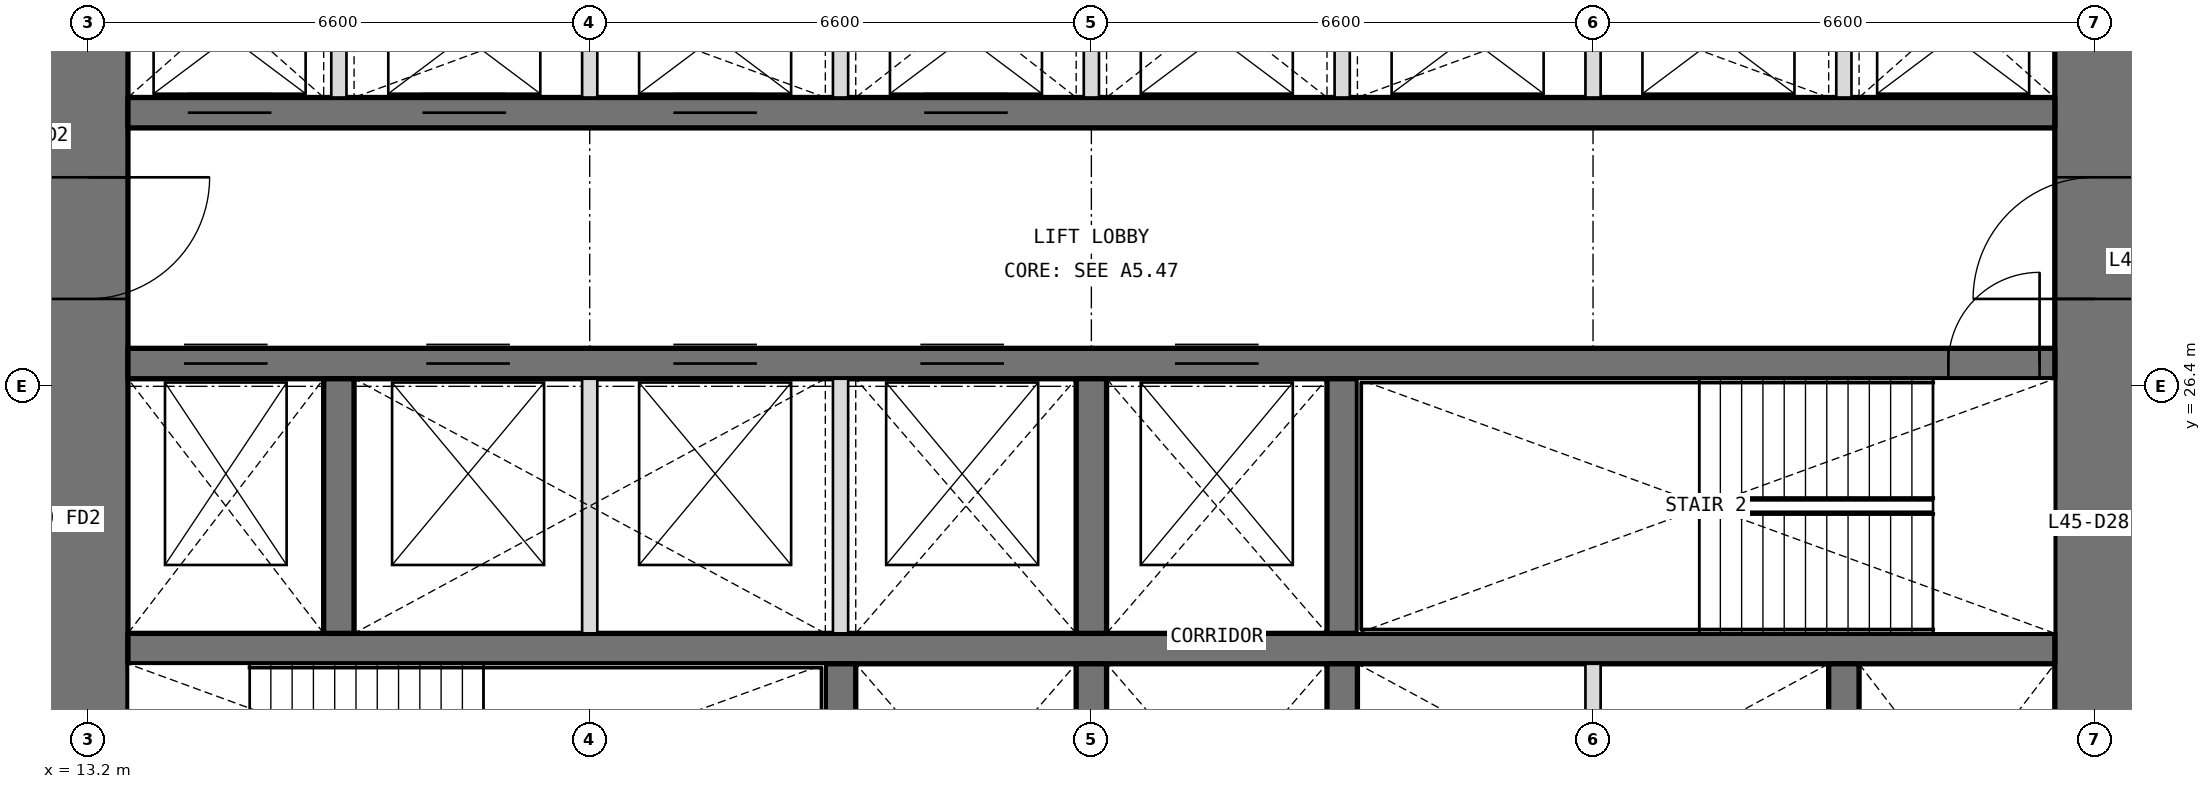
"""IFC4 building model, lengths in metres.
Left out: names, types, materials, properties, quantities, classifications, styles, units other than length and angle.
Written with IfcOpenShell. Run it as: python <this file> out.ifc"""

import sys

from ifc_helpers import new_model, si_unit, direction, frame, frame_2d, origin, place, context, subcontext, project, spatial, rectangle, extrude, element, fill, save


model = new_model("IFC4")
c1 = context("Model", 3, precision=1e-05, world=origin(), true_north=direction((0.0, 1.0)))
c2 = subcontext(c1, "Body", "Model", "MODEL_VIEW")
j1 = project(units=[si_unit("LENGTHUNIT", "METRE"), si_unit("PLANEANGLEUNIT", "RADIAN")], contexts=[c1])
p1 = place(None, origin())
s1 = spatial("IfcSite", under=j1, at=p1, CompositionType="ELEMENT")
p2 = place(p1, origin())
s2 = spatial("IfcBuilding", under=s1, at=p2, CompositionType="ELEMENT")
p3 = place(p2, frame((0.0, 0.0, 197.7)))
s3 = spatial("IfcBuildingStorey", under=s2, at=p3, CompositionType="ELEMENT", Elevation=197.7)
p4 = place(p3, frame((39.6, 13.725, 0.0), z_axis=(0.0, 0.0, 1.0), x_axis=(0.0, 1.0, 0.0)))
e1 = element("IfcWall", 1, at=p4, inside=s3, PredefinedType="SHEAR", context=c2, shape_type="SweptSolid", body=[
    extrude(rectangle(XDim=18.75, YDim=1.05, at=frame_2d((9.375, 0.0))), origin(), (0.0, 0.0, 1.0), 4.2),
])
p5 = place(p4, frame((3.025, 0.0, 0.0)))
e2 = element("IfcOpeningElement", 2, at=p5, cuts=e1, PredefinedType="OPENING", context=c2, shape_type="SweptSolid", body=[
    extrude(rectangle(XDim=1.6, YDim=2.1, at=frame_2d((0.8, 1.05))), frame((0.0, 0.535, 0.0), z_axis=(0.0, -1.0, 0.0), x_axis=(1.0, 0.0, 0.0)), (0.0, 0.0, 1.0), 1.07),
])
p6 = place(p4, frame((13.825, 0.0, 0.0)))
e3 = element("IfcOpeningElement", 3, at=p6, cuts=e1, PredefinedType="OPENING", context=c2, shape_type="SweptSolid", body=[
    extrude(rectangle(XDim=1.6, YDim=2.1, at=frame_2d((0.8, 1.05))), frame((0.0, 0.535, 0.0), z_axis=(0.0, -1.0, 0.0), x_axis=(1.0, 0.0, 0.0)), (0.0, 0.0, 1.0), 1.07),
])
p7 = place(p3, frame((13.2, 32.475, 0.0), z_axis=(0.0, 0.0, 1.0), x_axis=(0.0, -1.0, 0.0)))
e4 = element("IfcWall", 4, at=p7, inside=s3, PredefinedType="SHEAR", context=c2, shape_type="SweptSolid", body=[
    extrude(rectangle(XDim=18.75, YDim=1.05, at=frame_2d((9.375, 0.0))), origin(), (0.0, 0.0, 1.0), 4.2),
])
p8 = place(p7, frame((14.125, 0.0, 0.0)))
e5 = element("IfcOpeningElement", 5, at=p8, cuts=e4, PredefinedType="OPENING", context=c2, shape_type="SweptSolid", body=[
    extrude(rectangle(XDim=1.6, YDim=2.1, at=frame_2d((0.8, 1.05))), frame((0.0, 0.535, 0.0), z_axis=(0.0, -1.0, 0.0), x_axis=(1.0, 0.0, 0.0)), (0.0, 0.0, 1.0), 1.07),
])
p9 = place(p7, frame((3.325, 0.0, 0.0)))
e6 = element("IfcOpeningElement", 6, at=p9, cuts=e4, PredefinedType="OPENING", context=c2, shape_type="SweptSolid", body=[
    extrude(rectangle(XDim=1.6, YDim=2.1, at=frame_2d((0.8, 1.05))), frame((0.0, 0.535, 0.0), z_axis=(0.0, -1.0, 0.0), x_axis=(1.0, 0.0, 0.0)), (0.0, 0.0, 1.0), 1.07),
])
p10 = place(p3, frame((13.725, 22.95, 0.0), z_axis=(0.0, 0.0, 1.0), x_axis=(1.0, 0.0, 0.0)))
e7 = element("IfcWall", 7, at=p10, inside=s3, PredefinedType="SHEAR", context=c2, shape_type="SweptSolid", body=[
    extrude(rectangle(XDim=25.35, YDim=0.4, at=frame_2d((12.675, 0.0))), origin(), (0.0, 0.0, 1.0), 4.2),
])
p11 = place(p3, frame((13.725, 26.7, 0.0), z_axis=(0.0, 0.0, 1.0), x_axis=(1.0, 0.0, 0.0)))
e8 = element("IfcWall", 8, at=p11, inside=s3, PredefinedType="SHEAR", context=c2, shape_type="SweptSolid", body=[
    extrude(rectangle(XDim=25.35, YDim=0.4, at=frame_2d((12.675, 0.0))), origin(), (0.0, 0.0, 1.0), 4.2),
])
p12 = place(p11, frame((23.95, 0.0, 0.0)))
e9 = element("IfcOpeningElement", 9, at=p12, cuts=e8, PredefinedType="OPENING", context=c2, shape_type="SweptSolid", body=[
    extrude(rectangle(XDim=1.2, YDim=2.1, at=frame_2d((0.6, 1.05))), frame((0.0, 0.21, 0.0), z_axis=(0.0, -1.0, 0.0), x_axis=(1.0, 0.0, 0.0)), (0.0, 0.0, 1.0), 0.42),
])
p13 = place(p11, frame((0.738, 0.0, 0.0)))
e10 = element("IfcOpeningElement", 10, at=p13, cuts=e8, PredefinedType="OPENING", context=c2, shape_type="SweptSolid", body=[
    extrude(rectangle(XDim=1.1, YDim=2.1, at=frame_2d((0.55, 1.05))), frame((0.0, 0.21, 0.0), z_axis=(0.0, -1.0, 0.0), x_axis=(1.0, 0.0, 0.0)), (0.0, 0.0, 1.0), 0.42),
])
p14 = place(p11, frame((3.925, 0.0, 0.0)))
e11 = element("IfcOpeningElement", 11, at=p14, cuts=e8, PredefinedType="OPENING", context=c2, shape_type="SweptSolid", body=[
    extrude(rectangle(XDim=1.1, YDim=2.1, at=frame_2d((0.55, 1.05))), frame((0.0, 0.21, 0.0), z_axis=(0.0, -1.0, 0.0), x_axis=(1.0, 0.0, 0.0)), (0.0, 0.0, 1.0), 0.42),
])
p15 = place(p11, frame((7.175, 0.0, 0.0)))
e12 = element("IfcOpeningElement", 12, at=p15, cuts=e8, PredefinedType="OPENING", context=c2, shape_type="SweptSolid", body=[
    extrude(rectangle(XDim=1.1, YDim=2.1, at=frame_2d((0.55, 1.05))), frame((0.0, 0.21, 0.0), z_axis=(0.0, -1.0, 0.0), x_axis=(1.0, 0.0, 0.0)), (0.0, 0.0, 1.0), 0.42),
])
p16 = place(p11, frame((10.425, 0.0, 0.0)))
e13 = element("IfcOpeningElement", 13, at=p16, cuts=e8, PredefinedType="OPENING", context=c2, shape_type="SweptSolid", body=[
    extrude(rectangle(XDim=1.1, YDim=2.1, at=frame_2d((0.55, 1.05))), frame((0.0, 0.21, 0.0), z_axis=(0.0, -1.0, 0.0), x_axis=(1.0, 0.0, 0.0)), (0.0, 0.0, 1.0), 0.42),
])
p17 = place(p11, frame((13.775, 0.0, 0.0)))
e14 = element("IfcOpeningElement", 14, at=p17, cuts=e8, PredefinedType="OPENING", context=c2, shape_type="SweptSolid", body=[
    extrude(rectangle(XDim=1.1, YDim=2.1, at=frame_2d((0.55, 1.05))), frame((0.0, 0.21, 0.0), z_axis=(0.0, -1.0, 0.0), x_axis=(1.0, 0.0, 0.0)), (0.0, 0.0, 1.0), 0.42),
])
p18 = place(p3, frame((13.725, 30.0, 0.0), z_axis=(0.0, 0.0, 1.0), x_axis=(1.0, 0.0, 0.0)))
e15 = element("IfcWall", 15, at=p18, inside=s3, PredefinedType="SHEAR", context=c2, shape_type="SweptSolid", body=[
    extrude(rectangle(XDim=25.35, YDim=0.4, at=frame_2d((12.675, 0.0))), origin(), (0.0, 0.0, 1.0), 4.2),
])
p19 = place(p18, frame((0.788, 0.0, 0.0)))
e16 = element("IfcOpeningElement", 16, at=p19, cuts=e15, PredefinedType="OPENING", context=c2, shape_type="SweptSolid", body=[
    extrude(rectangle(XDim=1.1, YDim=2.1, at=frame_2d((0.55, 1.05))), frame((0.0, 0.21, 0.0), z_axis=(0.0, -1.0, 0.0), x_axis=(1.0, 0.0, 0.0)), (0.0, 0.0, 1.0), 0.42),
])
p20 = place(p18, frame((3.875, 0.0, 0.0)))
e17 = element("IfcOpeningElement", 17, at=p20, cuts=e15, PredefinedType="OPENING", context=c2, shape_type="SweptSolid", body=[
    extrude(rectangle(XDim=1.1, YDim=2.1, at=frame_2d((0.55, 1.05))), frame((0.0, 0.21, 0.0), z_axis=(0.0, -1.0, 0.0), x_axis=(1.0, 0.0, 0.0)), (0.0, 0.0, 1.0), 0.42),
])
p21 = place(p18, frame((7.175, 0.0, 0.0)))
e18 = element("IfcOpeningElement", 18, at=p21, cuts=e15, PredefinedType="OPENING", context=c2, shape_type="SweptSolid", body=[
    extrude(rectangle(XDim=1.1, YDim=2.1, at=frame_2d((0.55, 1.05))), frame((0.0, 0.21, 0.0), z_axis=(0.0, -1.0, 0.0), x_axis=(1.0, 0.0, 0.0)), (0.0, 0.0, 1.0), 0.42),
])
p22 = place(p18, frame((10.475, 0.0, 0.0)))
e19 = element("IfcOpeningElement", 19, at=p22, cuts=e15, PredefinedType="OPENING", context=c2, shape_type="SweptSolid", body=[
    extrude(rectangle(XDim=1.1, YDim=2.1, at=frame_2d((0.55, 1.05))), frame((0.0, 0.21, 0.0), z_axis=(0.0, -1.0, 0.0), x_axis=(1.0, 0.0, 0.0)), (0.0, 0.0, 1.0), 0.42),
])
for number, where, z_axis, x_axis in (
    (20, (23.1, 19.4, 0.0), (0.0, 0.0, 1.0), (0.0, 1.0, 0.0)),
    (21, (26.4, 19.4, 0.0), (0.0, 0.0, 1.0), (0.0, 1.0, 0.0)),
    (22, (29.7, 19.4, 0.0), (0.0, 0.0, 1.0), (0.0, 1.0, 0.0)),
    (23, (36.3, 19.4, 0.0), (0.0, 0.0, 1.0), (0.0, 1.0, 0.0)),
    (24, (16.5, 23.15, 0.0), (0.0, 0.0, 1.0), (0.0, 1.0, 0.0)),
    (25, (26.4, 23.15, 0.0), (0.0, 0.0, 1.0), (0.0, 1.0, 0.0)),
    (26, (29.7, 23.15, 0.0), (0.0, 0.0, 1.0), (0.0, 1.0, 0.0)),
):
    element("IfcWall", number, at=place(p3, frame(where, z_axis=z_axis, x_axis=x_axis)), inside=s3, PredefinedType="SHEAR", context=c2, shape_type="SweptSolid", body=[
        extrude(rectangle(XDim=3.35, YDim=0.4, at=frame_2d((1.675, 0.0))), origin(), (0.0, 0.0, 1.0), 4.2),
    ])
for number, where, z_axis, x_axis in (
    (27, (16.5, 30.2, 0.0), (0.0, 0.0, 1.0), (0.0, 1.0, 0.0)),
    (28, (19.8, 30.2, 0.0), (0.0, 0.0, 1.0), (0.0, 1.0, 0.0)),
    (29, (23.1, 30.2, 0.0), (0.0, 0.0, 1.0), (0.0, 1.0, 0.0)),
    (30, (26.4, 30.2, 0.0), (0.0, 0.0, 1.0), (0.0, 1.0, 0.0)),
    (31, (29.7, 30.2, 0.0), (0.0, 0.0, 1.0), (0.0, 1.0, 0.0)),
    (32, (33.0, 30.2, 0.0), (0.0, 0.0, 1.0), (0.0, 1.0, 0.0)),
    (33, (36.3, 30.2, 0.0), (0.0, 0.0, 1.0), (0.0, 1.0, 0.0)),
):
    element("IfcWall", number, at=place(p3, frame(where, z_axis=z_axis, x_axis=x_axis)), inside=s3, PredefinedType="PARTITIONING", context=c2, shape_type="SweptSolid", body=[
        extrude(rectangle(XDim=2.275, YDim=0.2, at=frame_2d((1.138, 0.0))), origin(), (0.0, 0.0, 1.0), 4.2),
    ])
for number, where, z_axis, x_axis in (
    (34, (33.0, 19.4, 0.0), (0.0, 0.0, 1.0), (0.0, 1.0, 0.0)),
    (35, (19.8, 23.15, 0.0), (0.0, 0.0, 1.0), (0.0, 1.0, 0.0)),
    (36, (23.1, 23.15, 0.0), (0.0, 0.0, 1.0), (0.0, 1.0, 0.0)),
):
    element("IfcWall", number, at=place(p3, frame(where, z_axis=z_axis, x_axis=x_axis)), inside=s3, PredefinedType="PARTITIONING", context=c2, shape_type="SweptSolid", body=[
        extrude(rectangle(XDim=3.35, YDim=0.2, at=frame_2d((1.675, 0.0))), origin(), (0.0, 0.0, 1.0), 4.2),
    ])
p23 = place(p12, origin())
e37 = element("IfcDoor", 37, at=p23, inside=s3, OperationType="SINGLE_SWING_RIGHT", PredefinedType="DOOR", context=c2, shape_type="SweptSolid", body=[
    extrude(rectangle(XDim=1.2, YDim=2.1, at=frame_2d((0.6, 1.05))), frame((0.0, 0.025, 0.0), z_axis=(0.0, -1.0, 0.0), x_axis=(1.0, 0.0, 0.0)), (0.0, 0.0, 1.0), 0.05),
])
fill(e9, e37)
p24 = place(p9, origin())
e38 = element("IfcDoor", 38, at=p24, inside=s3, OperationType="DOUBLE_DOOR_DOUBLE_SWING", PredefinedType="DOOR", context=c2, shape_type="SweptSolid", body=[
    extrude(rectangle(XDim=1.6, YDim=2.1, at=frame_2d((0.8, 1.05))), frame((0.0, 0.025, 0.0), z_axis=(0.0, -1.0, 0.0), x_axis=(1.0, 0.0, 0.0)), (0.0, 0.0, 1.0), 0.05),
])
fill(e6, e38)
p25 = place(p6, origin())
e39 = element("IfcDoor", 39, at=p25, inside=s3, OperationType="DOUBLE_DOOR_DOUBLE_SWING", PredefinedType="DOOR", context=c2, shape_type="SweptSolid", body=[
    extrude(rectangle(XDim=1.6, YDim=2.1, at=frame_2d((0.8, 1.05))), frame((0.0, 0.025, 0.0), z_axis=(0.0, -1.0, 0.0), x_axis=(1.0, 0.0, 0.0)), (0.0, 0.0, 1.0), 0.05),
])
fill(e3, e39)
p26 = place(p19, origin())
e40 = element("IfcDoor", 40, at=p26, inside=s3, OperationType="DOUBLE_DOOR_SLIDING", PredefinedType="DOOR", context=c2, shape_type="SweptSolid", body=[
    extrude(rectangle(XDim=1.1, YDim=2.1, at=frame_2d((0.55, 1.05))), frame((0.0, 0.025, 0.0), z_axis=(0.0, -1.0, 0.0), x_axis=(1.0, 0.0, 0.0)), (0.0, 0.0, 1.0), 0.05),
])
fill(e16, e40)
p27 = place(p20, origin())
e41 = element("IfcDoor", 41, at=p27, inside=s3, OperationType="DOUBLE_DOOR_SLIDING", PredefinedType="DOOR", context=c2, shape_type="SweptSolid", body=[
    extrude(rectangle(XDim=1.1, YDim=2.1, at=frame_2d((0.55, 1.05))), frame((0.0, 0.025, 0.0), z_axis=(0.0, -1.0, 0.0), x_axis=(1.0, 0.0, 0.0)), (0.0, 0.0, 1.0), 0.05),
])
fill(e17, e41)
p28 = place(p21, origin())
e42 = element("IfcDoor", 42, at=p28, inside=s3, OperationType="DOUBLE_DOOR_SLIDING", PredefinedType="DOOR", context=c2, shape_type="SweptSolid", body=[
    extrude(rectangle(XDim=1.1, YDim=2.1, at=frame_2d((0.55, 1.05))), frame((0.0, 0.025, 0.0), z_axis=(0.0, -1.0, 0.0), x_axis=(1.0, 0.0, 0.0)), (0.0, 0.0, 1.0), 0.05),
])
fill(e18, e42)
p29 = place(p22, origin())
e43 = element("IfcDoor", 43, at=p29, inside=s3, OperationType="DOUBLE_DOOR_SLIDING", PredefinedType="DOOR", context=c2, shape_type="SweptSolid", body=[
    extrude(rectangle(XDim=1.1, YDim=2.1, at=frame_2d((0.55, 1.05))), frame((0.0, 0.025, 0.0), z_axis=(0.0, -1.0, 0.0), x_axis=(1.0, 0.0, 0.0)), (0.0, 0.0, 1.0), 0.05),
])
fill(e19, e43)
p30 = place(p13, origin())
e44 = element("IfcDoor", 44, at=p30, inside=s3, OperationType="DOUBLE_DOOR_SLIDING", PredefinedType="DOOR", context=c2, shape_type="SweptSolid", body=[
    extrude(rectangle(XDim=1.1, YDim=2.1, at=frame_2d((0.55, 1.05))), frame((0.0, 0.025, 0.0), z_axis=(0.0, -1.0, 0.0), x_axis=(1.0, 0.0, 0.0)), (0.0, 0.0, 1.0), 0.05),
])
fill(e10, e44)
p31 = place(p14, origin())
e45 = element("IfcDoor", 45, at=p31, inside=s3, OperationType="DOUBLE_DOOR_SLIDING", PredefinedType="DOOR", context=c2, shape_type="SweptSolid", body=[
    extrude(rectangle(XDim=1.1, YDim=2.1, at=frame_2d((0.55, 1.05))), frame((0.0, 0.025, 0.0), z_axis=(0.0, -1.0, 0.0), x_axis=(1.0, 0.0, 0.0)), (0.0, 0.0, 1.0), 0.05),
])
fill(e11, e45)
p32 = place(p15, origin())
e46 = element("IfcDoor", 46, at=p32, inside=s3, OperationType="DOUBLE_DOOR_SLIDING", PredefinedType="DOOR", context=c2, shape_type="SweptSolid", body=[
    extrude(rectangle(XDim=1.1, YDim=2.1, at=frame_2d((0.55, 1.05))), frame((0.0, 0.025, 0.0), z_axis=(0.0, -1.0, 0.0), x_axis=(1.0, 0.0, 0.0)), (0.0, 0.0, 1.0), 0.05),
])
fill(e12, e46)
p33 = place(p16, origin())
e47 = element("IfcDoor", 47, at=p33, inside=s3, OperationType="DOUBLE_DOOR_SLIDING", PredefinedType="DOOR", context=c2, shape_type="SweptSolid", body=[
    extrude(rectangle(XDim=1.1, YDim=2.1, at=frame_2d((0.55, 1.05))), frame((0.0, 0.025, 0.0), z_axis=(0.0, -1.0, 0.0), x_axis=(1.0, 0.0, 0.0)), (0.0, 0.0, 1.0), 0.05),
])
fill(e13, e47)
p34 = place(p17, origin())
e48 = element("IfcDoor", 48, at=p34, inside=s3, OperationType="DOUBLE_DOOR_SLIDING", PredefinedType="DOOR", context=c2, shape_type="SweptSolid", body=[
    extrude(rectangle(XDim=1.1, YDim=2.1, at=frame_2d((0.55, 1.05))), frame((0.0, 0.025, 0.0), z_axis=(0.0, -1.0, 0.0), x_axis=(1.0, 0.0, 0.0)), (0.0, 0.0, 1.0), 0.05),
])
fill(e14, e48)
save(model, sys.argv[1])
